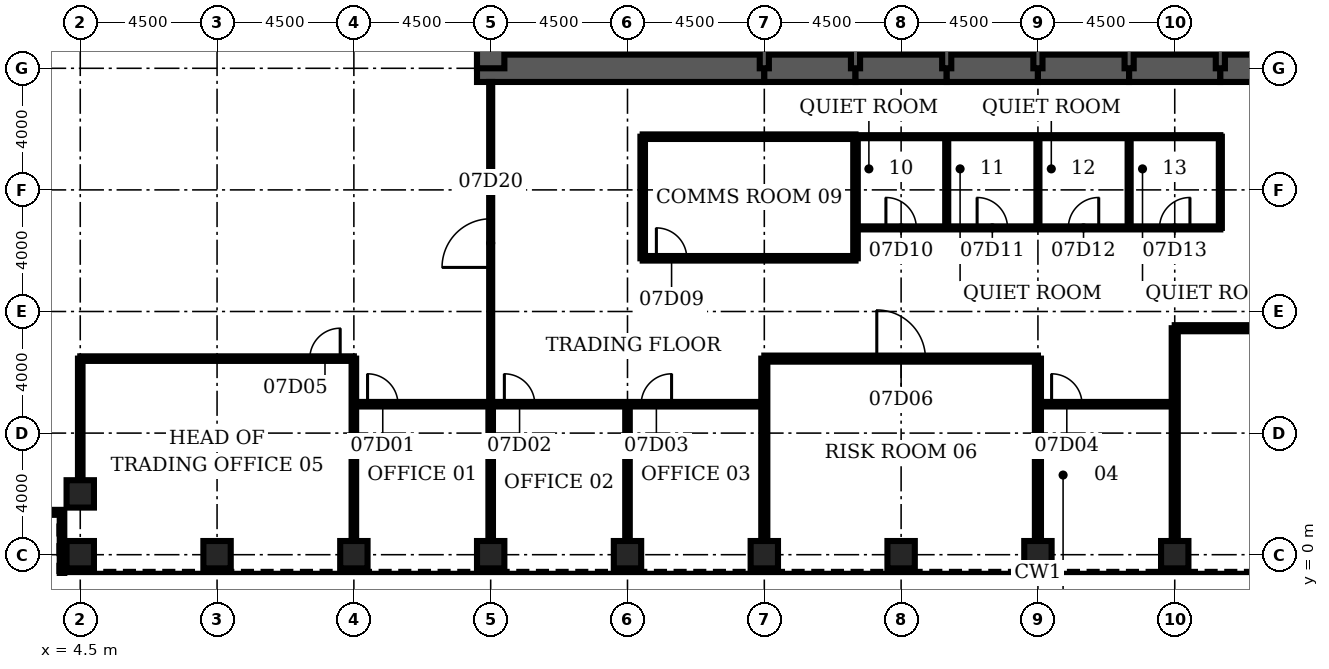
"""IFC4 building model, lengths in metres.
Left out: names, types, materials, properties, quantities, classifications, styles, units other than length and angle.
Written with IfcOpenShell. Run it as: python <this file> out.ifc"""

import sys

from ifc_helpers import new_model, si_unit, direction, frame, frame_2d, origin, origin_2d, place, context, subcontext, project, spatial, rectangle, hollow_rectangle, extrude, element, fill, save


model = new_model("IFC4")
c1 = context("Model", 3, precision=1e-05, world=origin(), true_north=direction((0.0, 1.0)))
c2 = subcontext(c1, "Body", "Model", "MODEL_VIEW")
j1 = project(units=[si_unit("LENGTHUNIT", "METRE"), si_unit("PLANEANGLEUNIT", "RADIAN")], contexts=[c1])
p1 = place(None, origin())
s1 = spatial("IfcSite", under=j1, at=p1, CompositionType="ELEMENT")
p2 = place(p1, origin())
s2 = spatial("IfcBuilding", under=s1, at=p2, CompositionType="ELEMENT")
p3 = place(p2, frame((0.0, 0.0, 36.5)))
s3 = spatial("IfcBuildingStorey", under=s2, at=p3, CompositionType="ELEMENT", Elevation=36.5)
for number, where, z_axis, x_axis in (
    (1, (4.5, 0.0, 0.0), (0.0, 0.0, 1.0), (0.0, 1.0, 0.0)),
    (2, (9.0, 0.0, 0.0), (0.0, 0.0, 1.0), (0.0, 1.0, 0.0)),
    (3, (13.5, 0.0, 0.0), (0.0, 0.0, 1.0), (0.0, 1.0, 0.0)),
    (4, (18.0, 0.0, 0.0), (0.0, 0.0, 1.0), (0.0, 1.0, 0.0)),
    (5, (22.5, 0.0, 0.0), (0.0, 0.0, 1.0), (0.0, 1.0, 0.0)),
    (6, (27.0, 0.0, 0.0), (0.0, 0.0, 1.0), (0.0, 1.0, 0.0)),
    (7, (31.5, 0.0, 0.0), (0.0, 0.0, 1.0), (0.0, 1.0, 0.0)),
    (8, (36.0, 0.0, 0.0), (0.0, 0.0, 1.0), (0.0, 1.0, 0.0)),
    (9, (40.5, 0.0, 0.0), (0.0, 0.0, 1.0), (0.0, 1.0, 0.0)),
    (10, (4.5, 2.0, 0.0), (0.0, 0.0, 1.0), (0.0, 1.0, 0.0)),
):
    element("IfcColumn", number, at=place(p3, frame(where, z_axis=z_axis, x_axis=x_axis)), inside=s3, PredefinedType="COLUMN", context=c2, shape_type="SweptSolid", body=[
        extrude(hollow_rectangle(XDim=0.9, YDim=0.9, WallThickness=0.12, at=origin_2d()), origin(), (0.0, 0.0, 1.0), 4.5),
    ])
p4 = place(p3, frame((17.55, 16.0, 0.0), z_axis=(0.0, 0.0, 1.0), x_axis=(1.0, 0.0, 0.0)))
e11 = element("IfcWall", 11, at=p4, inside=s3, PredefinedType="SHEAR", context=c2, shape_type="SweptSolid", body=[
    extrude(rectangle(XDim=9.45, YDim=0.9, at=frame_2d((4.725, 0.0))), origin(), (0.0, 0.0, 1.0), 4.5),
])
for number, where, z_axis, x_axis in (
    (12, (27.0, 16.0, 0.0), (0.0, 0.0, 1.0), (1.0, 0.0, 0.0)),
    (13, (30.0, 16.0, 0.0), (0.0, 0.0, 1.0), (1.0, 0.0, 0.0)),
    (14, (33.0, 16.0, 0.0), (0.0, 0.0, 1.0), (1.0, 0.0, 0.0)),
    (15, (36.0, 16.0, 0.0), (0.0, 0.0, 1.0), (1.0, 0.0, 0.0)),
    (16, (39.0, 16.0, 0.0), (0.0, 0.0, 1.0), (1.0, 0.0, 0.0)),
    (17, (42.0, 16.0, 0.0), (0.0, 0.0, 1.0), (1.0, 0.0, 0.0)),
):
    element("IfcWall", number, at=place(p3, frame(where, z_axis=z_axis, x_axis=x_axis)), inside=s3, PredefinedType="SHEAR", context=c2, shape_type="SweptSolid", body=[
        extrude(rectangle(XDim=3.0, YDim=0.9, at=frame_2d((1.5, 0.0))), origin(), (0.0, 0.0, 1.0), 4.5),
    ])
p5 = place(p3, frame((18.0, 19.2, 0.0), z_axis=(0.0, 0.0, 1.0), x_axis=(0.0, -1.0, 0.0)))
e18 = element("IfcWall", 18, at=p5, inside=s3, PredefinedType="SHEAR", context=c2, shape_type="SweptSolid", body=[
    extrude(rectangle(XDim=3.2, YDim=0.9, at=frame_2d((1.6, 0.0))), origin(), (0.0, 0.0, 1.0), 4.5),
])
for number, where, z_axis, x_axis in (
    (19, (27.0, 16.0, 0.0), (0.0, 0.0, 1.0), (0.0, 1.0, 0.0)),
    (20, (30.0, 16.0, 0.0), (0.0, 0.0, 1.0), (0.0, 1.0, 0.0)),
    (21, (33.0, 16.0, 0.0), (0.0, 0.0, 1.0), (0.0, 1.0, 0.0)),
    (22, (36.0, 16.0, 0.0), (0.0, 0.0, 1.0), (0.0, 1.0, 0.0)),
    (23, (39.0, 16.0, 0.0), (0.0, 0.0, 1.0), (0.0, 1.0, 0.0)),
    (24, (42.0, 16.0, 0.0), (0.0, 0.0, 1.0), (0.0, 1.0, 0.0)),
):
    element("IfcWall", number, at=place(p3, frame(where, z_axis=z_axis, x_axis=x_axis)), inside=s3, PredefinedType="SOLIDWALL", context=c2, shape_type="SweptSolid", body=[
        extrude(rectangle(XDim=3.2, YDim=0.3, at=frame_2d((1.6, 0.0))), origin(), (0.0, 0.0, 1.0), 4.5),
    ])
p6 = place(p3, frame((13.5, 4.95, 0.0), z_axis=(0.0, 0.0, 1.0), x_axis=(1.0, 0.0, 0.0)))
e25 = element("IfcWall", 25, at=p6, inside=s3, PredefinedType="PARTITIONING", context=c2, shape_type="SweptSolid", body=[
    extrude(rectangle(XDim=13.5, YDim=0.15, at=frame_2d((6.75, 0.0))), origin(), (0.0, 0.0, 1.0), 3.0),
])
p7 = place(p6, frame((0.45, 0.0, 0.0)))
e26 = element("IfcOpeningElement", 26, at=p7, cuts=e25, PredefinedType="OPENING", context=c2, shape_type="SweptSolid", body=[
    extrude(rectangle(XDim=1.0, YDim=2.1, at=frame_2d((0.5, 1.05))), frame((0.0, 0.085, 0.0), z_axis=(0.0, -1.0, 0.0), x_axis=(1.0, 0.0, 0.0)), (0.0, 0.0, 1.0), 0.17),
])
p8 = place(p6, frame((4.95, 0.0, 0.0)))
e27 = element("IfcOpeningElement", 27, at=p8, cuts=e25, PredefinedType="OPENING", context=c2, shape_type="SweptSolid", body=[
    extrude(rectangle(XDim=1.0, YDim=2.1, at=frame_2d((0.5, 1.05))), frame((0.0, 0.085, 0.0), z_axis=(0.0, -1.0, 0.0), x_axis=(1.0, 0.0, 0.0)), (0.0, 0.0, 1.0), 0.17),
])
p9 = place(p6, frame((9.45, 0.0, 0.0)))
e28 = element("IfcOpeningElement", 28, at=p9, cuts=e25, PredefinedType="OPENING", context=c2, shape_type="SweptSolid", body=[
    extrude(rectangle(XDim=1.0, YDim=2.1, at=frame_2d((0.5, 1.05))), frame((0.0, 0.085, 0.0), z_axis=(0.0, -1.0, 0.0), x_axis=(1.0, 0.0, 0.0)), (0.0, 0.0, 1.0), 0.17),
])
p10 = place(p3, frame((36.0, 4.95, 0.0), z_axis=(0.0, 0.0, 1.0), x_axis=(1.0, 0.0, 0.0)))
e29 = element("IfcWall", 29, at=p10, inside=s3, PredefinedType="PARTITIONING", context=c2, shape_type="SweptSolid", body=[
    extrude(rectangle(XDim=4.5, YDim=0.15, at=frame_2d((2.25, 0.0))), origin(), (0.0, 0.0, 1.0), 3.0),
])
p11 = place(p10, frame((0.45, 0.0, 0.0)))
e30 = element("IfcOpeningElement", 30, at=p11, cuts=e29, PredefinedType="OPENING", context=c2, shape_type="SweptSolid", body=[
    extrude(rectangle(XDim=1.0, YDim=2.1, at=frame_2d((0.5, 1.05))), frame((0.0, 0.085, 0.0), z_axis=(0.0, -1.0, 0.0), x_axis=(1.0, 0.0, 0.0)), (0.0, 0.0, 1.0), 0.17),
])
p12 = place(p3, frame((4.5, 6.45, 0.0), z_axis=(0.0, 0.0, 1.0), x_axis=(1.0, 0.0, 0.0)))
e31 = element("IfcWall", 31, at=p12, inside=s3, PredefinedType="PARTITIONING", context=c2, shape_type="SweptSolid", body=[
    extrude(rectangle(XDim=9.0, YDim=0.15, at=frame_2d((4.5, 0.0))), origin(), (0.0, 0.0, 1.0), 3.0),
])
p13 = place(p12, frame((7.55, 0.0, 0.0)))
e32 = element("IfcOpeningElement", 32, at=p13, cuts=e31, PredefinedType="OPENING", context=c2, shape_type="SweptSolid", body=[
    extrude(rectangle(XDim=1.0, YDim=2.1, at=frame_2d((0.5, 1.05))), frame((0.0, 0.085, 0.0), z_axis=(0.0, -1.0, 0.0), x_axis=(1.0, 0.0, 0.0)), (0.0, 0.0, 1.0), 0.17),
])
p14 = place(p3, frame((27.0, 6.45, 0.0), z_axis=(0.0, 0.0, 1.0), x_axis=(1.0, 0.0, 0.0)))
e33 = element("IfcWall", 33, at=p14, inside=s3, PredefinedType="PARTITIONING", context=c2, shape_type="SweptSolid", body=[
    extrude(rectangle(XDim=9.0, YDim=0.2, at=frame_2d((4.5, 0.0))), origin(), (0.0, 0.0, 1.0), 3.0),
])
p15 = place(p14, frame((3.7, 0.0, 0.0)))
e34 = element("IfcOpeningElement", 34, at=p15, cuts=e33, PredefinedType="OPENING", context=c2, shape_type="SweptSolid", body=[
    extrude(rectangle(XDim=1.6, YDim=2.1, at=frame_2d((0.8, 1.05))), frame((0.0, 0.11, 0.0), z_axis=(0.0, -1.0, 0.0), x_axis=(1.0, 0.0, 0.0)), (0.0, 0.0, 1.0), 0.22),
])
p16 = place(p3, frame((40.5, 7.45, 0.0), z_axis=(0.0, 0.0, 1.0), x_axis=(1.0, 0.0, 0.0)))
e35 = element("IfcWall", 35, at=p16, inside=s3, PredefinedType="PARTITIONING", context=c2, shape_type="SweptSolid", body=[
    extrude(rectangle(XDim=18.0, YDim=0.2, at=frame_2d((9.0, 0.0))), origin(), (0.0, 0.0, 1.0), 3.0),
])
p17 = place(p16, frame((8.2, 0.0, 0.0)))
e36 = element("IfcOpeningElement", 36, at=p17, cuts=e35, PredefinedType="OPENING", context=c2, shape_type="SweptSolid", body=[
    extrude(rectangle(XDim=1.6, YDim=2.1, at=frame_2d((0.8, 1.05))), frame((0.0, 0.11, 0.0), z_axis=(0.0, -1.0, 0.0), x_axis=(1.0, 0.0, 0.0)), (0.0, 0.0, 1.0), 0.22),
])
p18 = place(p3, frame((23.0, 9.75, 0.0), z_axis=(0.0, 0.0, 1.0), x_axis=(1.0, 0.0, 0.0)))
e37 = element("IfcWall", 37, at=p18, inside=s3, PredefinedType="PARTITIONING", context=c2, shape_type="SweptSolid", body=[
    extrude(rectangle(XDim=7.0, YDim=0.15, at=frame_2d((3.5, 0.0))), origin(), (0.0, 0.0, 1.0), 3.0),
])
p19 = place(p18, frame((0.45, 0.0, 0.0)))
e38 = element("IfcOpeningElement", 38, at=p19, cuts=e37, PredefinedType="OPENING", context=c2, shape_type="SweptSolid", body=[
    extrude(rectangle(XDim=1.0, YDim=2.1, at=frame_2d((0.5, 1.05))), frame((0.0, 0.085, 0.0), z_axis=(0.0, -1.0, 0.0), x_axis=(1.0, 0.0, 0.0)), (0.0, 0.0, 1.0), 0.17),
])
p20 = place(p3, frame((30.0, 10.75, 0.0), z_axis=(0.0, 0.0, 1.0), x_axis=(1.0, 0.0, 0.0)))
e39 = element("IfcWall", 39, at=p20, inside=s3, PredefinedType="PARTITIONING", context=c2, shape_type="SweptSolid", body=[
    extrude(rectangle(XDim=12.0, YDim=0.1, at=frame_2d((6.0, 0.0))), origin(), (0.0, 0.0, 1.0), 3.0),
])
p21 = place(p20, frame((1.0, 0.0, 0.0)))
e40 = element("IfcOpeningElement", 40, at=p21, cuts=e39, PredefinedType="OPENING", context=c2, shape_type="SweptSolid", body=[
    extrude(rectangle(XDim=1.0, YDim=2.1, at=frame_2d((0.5, 1.05))), frame((0.0, 0.06, 0.0), z_axis=(0.0, -1.0, 0.0), x_axis=(1.0, 0.0, 0.0)), (0.0, 0.0, 1.0), 0.12),
])
p22 = place(p20, frame((4.0, 0.0, 0.0)))
e41 = element("IfcOpeningElement", 41, at=p22, cuts=e39, PredefinedType="OPENING", context=c2, shape_type="SweptSolid", body=[
    extrude(rectangle(XDim=1.0, YDim=2.1, at=frame_2d((0.5, 1.05))), frame((0.0, 0.06, 0.0), z_axis=(0.0, -1.0, 0.0), x_axis=(1.0, 0.0, 0.0)), (0.0, 0.0, 1.0), 0.12),
])
p23 = place(p20, frame((7.0, 0.0, 0.0)))
e42 = element("IfcOpeningElement", 42, at=p23, cuts=e39, PredefinedType="OPENING", context=c2, shape_type="SweptSolid", body=[
    extrude(rectangle(XDim=1.0, YDim=2.1, at=frame_2d((0.5, 1.05))), frame((0.0, 0.06, 0.0), z_axis=(0.0, -1.0, 0.0), x_axis=(1.0, 0.0, 0.0)), (0.0, 0.0, 1.0), 0.12),
])
p24 = place(p20, frame((10.0, 0.0, 0.0)))
e43 = element("IfcOpeningElement", 43, at=p24, cuts=e39, PredefinedType="OPENING", context=c2, shape_type="SweptSolid", body=[
    extrude(rectangle(XDim=1.0, YDim=2.1, at=frame_2d((0.5, 1.05))), frame((0.0, 0.06, 0.0), z_axis=(0.0, -1.0, 0.0), x_axis=(1.0, 0.0, 0.0)), (0.0, 0.0, 1.0), 0.12),
])
p25 = place(p3, frame((23.0, 13.75, 0.0), z_axis=(0.0, 0.0, 1.0), x_axis=(1.0, 0.0, 0.0)))
e44 = element("IfcWall", 44, at=p25, inside=s3, PredefinedType="PARTITIONING", context=c2, shape_type="SweptSolid", body=[
    extrude(rectangle(XDim=7.0, YDim=0.15, at=frame_2d((3.5, 0.0))), origin(), (0.0, 0.0, 1.0), 3.0),
])
p26 = place(p3, frame((30.0, 13.75, 0.0), z_axis=(0.0, 0.0, 1.0), x_axis=(1.0, 0.0, 0.0)))
e45 = element("IfcWall", 45, at=p26, inside=s3, PredefinedType="PARTITIONING", context=c2, shape_type="SweptSolid", body=[
    extrude(rectangle(XDim=12.0, YDim=0.1, at=frame_2d((6.0, 0.0))), origin(), (0.0, 0.0, 1.0), 3.0),
])
p27 = place(p3, frame((4.5, 2.45, 0.0), z_axis=(0.0, 0.0, 1.0), x_axis=(0.0, 1.0, 0.0)))
e46 = element("IfcWall", 46, at=p27, inside=s3, PredefinedType="PARTITIONING", context=c2, shape_type="SweptSolid", body=[
    extrude(rectangle(XDim=4.0, YDim=0.15, at=frame_2d((2.0, 0.0))), origin(), (0.0, 0.0, 1.0), 3.0),
])
p28 = place(p3, frame((13.5, 0.45, 0.0), z_axis=(0.0, 0.0, 1.0), x_axis=(0.0, 1.0, 0.0)))
e47 = element("IfcWall", 47, at=p28, inside=s3, PredefinedType="PARTITIONING", context=c2, shape_type="SweptSolid", body=[
    extrude(rectangle(XDim=6.0, YDim=0.15, at=frame_2d((3.0, 0.0))), origin(), (0.0, 0.0, 1.0), 3.0),
])
p29 = place(p3, frame((18.0, 0.45, 0.0), z_axis=(0.0, 0.0, 1.0), x_axis=(0.0, 1.0, 0.0)))
e48 = element("IfcWall", 48, at=p29, inside=s3, PredefinedType="PARTITIONING", context=c2, shape_type="SweptSolid", body=[
    extrude(rectangle(XDim=4.5, YDim=0.15, at=frame_2d((2.25, 0.0))), origin(), (0.0, 0.0, 1.0), 3.0),
])
p30 = place(p3, frame((18.0, 4.95, 0.0), z_axis=(0.0, 0.0, 1.0), x_axis=(0.0, 1.0, 0.0)))
e49 = element("IfcWall", 49, at=p30, inside=s3, PredefinedType="PARTITIONING", context=c2, shape_type="SweptSolid", body=[
    extrude(rectangle(XDim=10.6, YDim=0.1, at=frame_2d((5.3, 0.0))), origin(), (0.0, 0.0, 1.0), 3.0),
])
p31 = place(p30, frame((4.5, 0.0, 0.0)))
e50 = element("IfcOpeningElement", 50, at=p31, cuts=e49, PredefinedType="OPENING", context=c2, shape_type="SweptSolid", body=[
    extrude(rectangle(XDim=1.6, YDim=2.1, at=frame_2d((0.8, 1.05))), frame((0.0, 0.06, 0.0), z_axis=(0.0, -1.0, 0.0), x_axis=(1.0, 0.0, 0.0)), (0.0, 0.0, 1.0), 0.12),
])
p32 = place(p3, frame((22.5, 0.45, 0.0), z_axis=(0.0, 0.0, 1.0), x_axis=(0.0, 1.0, 0.0)))
e51 = element("IfcWall", 51, at=p32, inside=s3, PredefinedType="PARTITIONING", context=c2, shape_type="SweptSolid", body=[
    extrude(rectangle(XDim=4.5, YDim=0.15, at=frame_2d((2.25, 0.0))), origin(), (0.0, 0.0, 1.0), 3.0),
])
p33 = place(p3, frame((23.0, 9.75, 0.0), z_axis=(0.0, 0.0, 1.0), x_axis=(0.0, 1.0, 0.0)))
e52 = element("IfcWall", 52, at=p33, inside=s3, PredefinedType="PARTITIONING", context=c2, shape_type="SweptSolid", body=[
    extrude(rectangle(XDim=4.0, YDim=0.15, at=frame_2d((2.0, 0.0))), origin(), (0.0, 0.0, 1.0), 3.0),
])
p34 = place(p3, frame((27.0, 0.45, 0.0), z_axis=(0.0, 0.0, 1.0), x_axis=(0.0, 1.0, 0.0)))
e53 = element("IfcWall", 53, at=p34, inside=s3, PredefinedType="PARTITIONING", context=c2, shape_type="SweptSolid", body=[
    extrude(rectangle(XDim=6.0, YDim=0.2, at=frame_2d((3.0, 0.0))), origin(), (0.0, 0.0, 1.0), 3.0),
])
p35 = place(p3, frame((30.0, 9.75, 0.0), z_axis=(0.0, 0.0, 1.0), x_axis=(0.0, 1.0, 0.0)))
e54 = element("IfcWall", 54, at=p35, inside=s3, PredefinedType="PARTITIONING", context=c2, shape_type="SweptSolid", body=[
    extrude(rectangle(XDim=4.0, YDim=0.15, at=frame_2d((2.0, 0.0))), origin(), (0.0, 0.0, 1.0), 3.0),
])
p36 = place(p3, frame((33.0, 10.75, 0.0), z_axis=(0.0, 0.0, 1.0), x_axis=(0.0, 1.0, 0.0)))
e55 = element("IfcWall", 55, at=p36, inside=s3, PredefinedType="PARTITIONING", context=c2, shape_type="SweptSolid", body=[
    extrude(rectangle(XDim=3.0, YDim=0.1, at=frame_2d((1.5, 0.0))), origin(), (0.0, 0.0, 1.0), 3.0),
])
p37 = place(p3, frame((36.0, 0.45, 0.0), z_axis=(0.0, 0.0, 1.0), x_axis=(0.0, 1.0, 0.0)))
e56 = element("IfcWall", 56, at=p37, inside=s3, PredefinedType="PARTITIONING", context=c2, shape_type="SweptSolid", body=[
    extrude(rectangle(XDim=6.0, YDim=0.2, at=frame_2d((3.0, 0.0))), origin(), (0.0, 0.0, 1.0), 3.0),
])
for number, where, z_axis, x_axis in (
    (57, (36.0, 10.75, 0.0), (0.0, 0.0, 1.0), (0.0, 1.0, 0.0)),
    (58, (39.0, 10.75, 0.0), (0.0, 0.0, 1.0), (0.0, 1.0, 0.0)),
):
    element("IfcWall", number, at=place(p3, frame(where, z_axis=z_axis, x_axis=x_axis)), inside=s3, PredefinedType="PARTITIONING", context=c2, shape_type="SweptSolid", body=[
        extrude(rectangle(XDim=3.0, YDim=0.1, at=frame_2d((1.5, 0.0))), origin(), (0.0, 0.0, 1.0), 3.0),
    ])
p38 = place(p3, frame((40.5, 0.45, 0.0), z_axis=(0.0, 0.0, 1.0), x_axis=(0.0, 1.0, 0.0)))
e59 = element("IfcWall", 59, at=p38, inside=s3, PredefinedType="PARTITIONING", context=c2, shape_type="SweptSolid", body=[
    extrude(rectangle(XDim=7.0, YDim=0.2, at=frame_2d((3.5, 0.0))), origin(), (0.0, 0.0, 1.0), 3.0),
])
p39 = place(p3, frame((42.0, 10.75, 0.0), z_axis=(0.0, 0.0, 1.0), x_axis=(0.0, 1.0, 0.0)))
e60 = element("IfcWall", 60, at=p39, inside=s3, PredefinedType="PARTITIONING", context=c2, shape_type="SweptSolid", body=[
    extrude(rectangle(XDim=3.0, YDim=0.1, at=frame_2d((1.5, 0.0))), origin(), (0.0, 0.0, 1.0), 3.0),
])
p40 = place(p3, frame((1.65, 1.4, 0.0), z_axis=(0.0, 0.0, 1.0), x_axis=(1.0, 0.0, 0.0)))
e61 = element("IfcWall", 61, at=p40, inside=s3, PredefinedType="ELEMENTEDWALL", context=c2, shape_type="SweptSolid", body=[
    extrude(rectangle(XDim=2.25, YDim=0.15, at=frame_2d((1.125, 0.0))), origin(), (0.0, 0.0, 1.0), 4.32),
])
p41 = place(p3, frame((3.9, 1.4, 0.0), z_axis=(0.0, 0.0, 1.0), x_axis=(0.0, -1.0, 0.0)))
e62 = element("IfcWall", 62, at=p41, inside=s3, PredefinedType="ELEMENTEDWALL", context=c2, shape_type="SweptSolid", body=[
    extrude(rectangle(XDim=2.0, YDim=0.15, at=frame_2d((1.0, 0.0))), origin(), (0.0, 0.0, 1.0), 4.32),
])
p42 = place(p7, origin())
e63 = element("IfcDoor", 63, at=p42, inside=s3, OperationType="SINGLE_SWING_LEFT", PredefinedType="DOOR", context=c2, shape_type="SweptSolid", body=[
    extrude(rectangle(XDim=1.0, YDim=2.1, at=frame_2d((0.5, 1.05))), frame((0.0, 0.025, 0.0), z_axis=(0.0, -1.0, 0.0), x_axis=(1.0, 0.0, 0.0)), (0.0, 0.0, 1.0), 0.05),
])
fill(e26, e63)
p43 = place(p8, origin())
e64 = element("IfcDoor", 64, at=p43, inside=s3, OperationType="SINGLE_SWING_LEFT", PredefinedType="DOOR", context=c2, shape_type="SweptSolid", body=[
    extrude(rectangle(XDim=1.0, YDim=2.1, at=frame_2d((0.5, 1.05))), frame((0.0, 0.025, 0.0), z_axis=(0.0, -1.0, 0.0), x_axis=(1.0, 0.0, 0.0)), (0.0, 0.0, 1.0), 0.05),
])
fill(e27, e64)
p44 = place(p9, origin())
e65 = element("IfcDoor", 65, at=p44, inside=s3, OperationType="SINGLE_SWING_RIGHT", PredefinedType="DOOR", context=c2, shape_type="SweptSolid", body=[
    extrude(rectangle(XDim=1.0, YDim=2.1, at=frame_2d((0.5, 1.05))), frame((0.0, 0.025, 0.0), z_axis=(0.0, -1.0, 0.0), x_axis=(1.0, 0.0, 0.0)), (0.0, 0.0, 1.0), 0.05),
])
fill(e28, e65)
p45 = place(p11, origin())
e66 = element("IfcDoor", 66, at=p45, inside=s3, OperationType="SINGLE_SWING_LEFT", PredefinedType="DOOR", context=c2, shape_type="SweptSolid", body=[
    extrude(rectangle(XDim=1.0, YDim=2.1, at=frame_2d((0.5, 1.05))), frame((0.0, 0.025, 0.0), z_axis=(0.0, -1.0, 0.0), x_axis=(1.0, 0.0, 0.0)), (0.0, 0.0, 1.0), 0.05),
])
fill(e30, e66)
p46 = place(p13, origin())
e67 = element("IfcDoor", 67, at=p46, inside=s3, OperationType="SINGLE_SWING_RIGHT", PredefinedType="DOOR", context=c2, shape_type="SweptSolid", body=[
    extrude(rectangle(XDim=1.0, YDim=2.1, at=frame_2d((0.5, 1.05))), frame((0.0, 0.025, 0.0), z_axis=(0.0, -1.0, 0.0), x_axis=(1.0, 0.0, 0.0)), (0.0, 0.0, 1.0), 0.05),
])
fill(e32, e67)
p47 = place(p15, origin())
e68 = element("IfcDoor", 68, at=p47, inside=s3, OperationType="SINGLE_SWING_LEFT", PredefinedType="DOOR", context=c2, shape_type="SweptSolid", body=[
    extrude(rectangle(XDim=1.6, YDim=2.1, at=frame_2d((0.8, 1.05))), frame((0.0, 0.025, 0.0), z_axis=(0.0, -1.0, 0.0), x_axis=(1.0, 0.0, 0.0)), (0.0, 0.0, 1.0), 0.05),
])
fill(e34, e68)
p48 = place(p19, origin())
e69 = element("IfcDoor", 69, at=p48, inside=s3, OperationType="SINGLE_SWING_LEFT", PredefinedType="DOOR", context=c2, shape_type="SweptSolid", body=[
    extrude(rectangle(XDim=1.0, YDim=2.1, at=frame_2d((0.5, 1.05))), frame((0.0, 0.025, 0.0), z_axis=(0.0, -1.0, 0.0), x_axis=(1.0, 0.0, 0.0)), (0.0, 0.0, 1.0), 0.05),
])
fill(e38, e69)
p49 = place(p21, origin())
e70 = element("IfcDoor", 70, at=p49, inside=s3, OperationType="SINGLE_SWING_LEFT", PredefinedType="DOOR", context=c2, shape_type="SweptSolid", body=[
    extrude(rectangle(XDim=1.0, YDim=2.1, at=frame_2d((0.5, 1.05))), frame((0.0, 0.025, 0.0), z_axis=(0.0, -1.0, 0.0), x_axis=(1.0, 0.0, 0.0)), (0.0, 0.0, 1.0), 0.05),
])
fill(e40, e70)
p50 = place(p22, origin())
e71 = element("IfcDoor", 71, at=p50, inside=s3, OperationType="SINGLE_SWING_LEFT", PredefinedType="DOOR", context=c2, shape_type="SweptSolid", body=[
    extrude(rectangle(XDim=1.0, YDim=2.1, at=frame_2d((0.5, 1.05))), frame((0.0, 0.025, 0.0), z_axis=(0.0, -1.0, 0.0), x_axis=(1.0, 0.0, 0.0)), (0.0, 0.0, 1.0), 0.05),
])
fill(e41, e71)
p51 = place(p23, origin())
e72 = element("IfcDoor", 72, at=p51, inside=s3, OperationType="SINGLE_SWING_RIGHT", PredefinedType="DOOR", context=c2, shape_type="SweptSolid", body=[
    extrude(rectangle(XDim=1.0, YDim=2.1, at=frame_2d((0.5, 1.05))), frame((0.0, 0.025, 0.0), z_axis=(0.0, -1.0, 0.0), x_axis=(1.0, 0.0, 0.0)), (0.0, 0.0, 1.0), 0.05),
])
fill(e42, e72)
p52 = place(p24, origin())
e73 = element("IfcDoor", 73, at=p52, inside=s3, OperationType="SINGLE_SWING_RIGHT", PredefinedType="DOOR", context=c2, shape_type="SweptSolid", body=[
    extrude(rectangle(XDim=1.0, YDim=2.1, at=frame_2d((0.5, 1.05))), frame((0.0, 0.025, 0.0), z_axis=(0.0, -1.0, 0.0), x_axis=(1.0, 0.0, 0.0)), (0.0, 0.0, 1.0), 0.05),
])
fill(e43, e73)
p53 = place(p31, origin())
e74 = element("IfcDoor", 74, at=p53, inside=s3, OperationType="SINGLE_SWING_LEFT", PredefinedType="DOOR", context=c2, shape_type="SweptSolid", body=[
    extrude(rectangle(XDim=1.6, YDim=2.1, at=frame_2d((0.8, 1.05))), frame((0.0, 0.025, 0.0), z_axis=(0.0, -1.0, 0.0), x_axis=(1.0, 0.0, 0.0)), (0.0, 0.0, 1.0), 0.05),
])
fill(e50, e74)
save(model, sys.argv[1])
